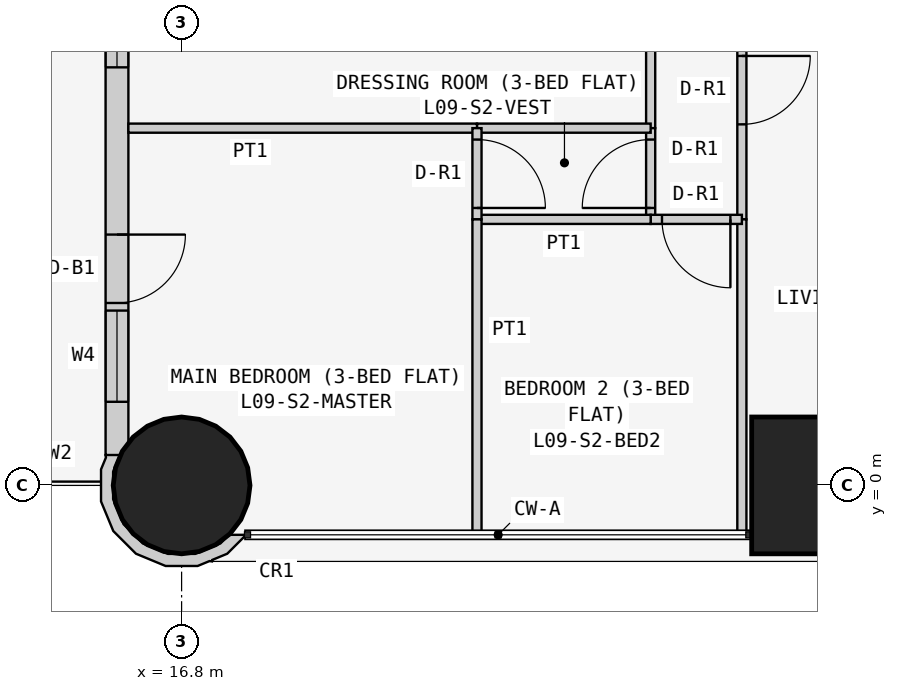
"""IFC4 building model, lengths in metres.
Left out: names, types, materials, properties, quantities, classifications, styles, units other than length and angle.
Written with IfcOpenShell. Run it as: python <this file> out.ifc"""

import sys

from ifc_helpers import new_model, si_unit, direction, frame, frame_2d, origin, origin_2d, place, context, subcontext, project, spatial, polyline, rectangle, circle, outline, extrude, element, fill, save


model = new_model("IFC4")
c1 = context("Model", 3, precision=1e-05, world=origin(), true_north=direction((0.0, 1.0)))
c2 = subcontext(c1, "Body", "Model", "MODEL_VIEW")
j1 = project(units=[si_unit("LENGTHUNIT", "METRE"), si_unit("PLANEANGLEUNIT", "RADIAN")], contexts=[c1])
p1 = place(None, origin())
s1 = spatial("IfcSite", under=j1, at=p1, CompositionType="ELEMENT")
p2 = place(p1, origin())
s2 = spatial("IfcBuilding", under=s1, at=p2, CompositionType="ELEMENT")
p3 = place(p2, frame((0.0, 0.0, 41.7)))
s3 = spatial("IfcBuildingStorey", under=s2, at=p3, CompositionType="ELEMENT", Elevation=41.7)
p4 = place(p3, frame((16.8, 0.0, 0.0), z_axis=(0.0, 0.0, 1.0), x_axis=(1.0, 0.0, 0.0)))
e1 = element("IfcColumn", 1, at=p4, inside=s3, PredefinedType="COLUMN", context=c2, shape_type="SweptSolid", body=[
    extrude(circle(Radius=0.9, at=origin_2d()), origin(), (0.0, 0.0, 1.0), 3.6),
])
p5 = place(p3, frame((25.2, 0.0, 0.0), z_axis=(0.0, 0.0, 1.0), x_axis=(1.0, 0.0, 0.0)))
e2 = element("IfcColumn", 2, at=p5, inside=s3, PredefinedType="COLUMN", context=c2, shape_type="SweptSolid", body=[
    extrude(rectangle(XDim=1.8, YDim=1.8, at=origin_2d()), origin(), (0.0, 0.0, 1.0), 3.6),
])
p6 = place(p3, frame((15.95, 15.8, 0.0), z_axis=(0.0, 0.0, 1.0), x_axis=(0.0, -1.0, 0.0)))
e3 = element("IfcWall", 3, at=p6, inside=s3, PredefinedType="SOLIDWALL", context=c2, shape_type="SweptSolid", body=[
    extrude(rectangle(XDim=15.4, YDim=0.3, at=frame_2d((7.7, 0.0))), origin(), (0.0, 0.0, 1.0), 3.45),
])
p7 = place(p6, frame((1.2, 0.0, 0.9)))
e4 = element("IfcOpeningElement", 4, at=p7, cuts=e3, PredefinedType="OPENING", context=c2, shape_type="SweptSolid", body=[
    extrude(rectangle(XDim=1.8, YDim=1.5, at=frame_2d((0.9, 0.75))), frame((0.0, 0.16, 0.0), z_axis=(0.0, -1.0, 0.0), x_axis=(1.0, 0.0, 0.0)), (0.0, 0.0, 1.0), 0.32),
])
p8 = place(p6, frame((4.95, 0.0, 1.5)))
e5 = element("IfcOpeningElement", 5, at=p8, cuts=e3, PredefinedType="OPENING", context=c2, shape_type="SweptSolid", body=[
    extrude(rectangle(XDim=0.9, YDim=0.7, at=frame_2d((0.45, 0.35))), frame((0.0, 0.16, 0.0), z_axis=(0.0, -1.0, 0.0), x_axis=(1.0, 0.0, 0.0)), (0.0, 0.0, 1.0), 0.32),
])
p9 = place(p6, frame((8.5, 0.0, 0.9)))
e6 = element("IfcOpeningElement", 6, at=p9, cuts=e3, PredefinedType="OPENING", context=c2, shape_type="SweptSolid", body=[
    extrude(rectangle(XDim=1.8, YDim=1.5, at=frame_2d((0.9, 0.75))), frame((0.0, 0.16, 0.0), z_axis=(0.0, -1.0, 0.0), x_axis=(1.0, 0.0, 0.0)), (0.0, 0.0, 1.0), 0.32),
])
p10 = place(p6, frame((12.5, 0.0, 0.0)))
e7 = element("IfcOpeningElement", 7, at=p10, cuts=e3, PredefinedType="OPENING", context=c2, shape_type="SweptSolid", body=[
    extrude(rectangle(XDim=0.9, YDim=2.4, at=frame_2d((0.45, 1.2))), frame((0.0, 0.16, 0.0), z_axis=(0.0, -1.0, 0.0), x_axis=(1.0, 0.0, 0.0)), (0.0, 0.0, 1.0), 0.32),
])
p11 = place(p6, frame((13.5, 0.0, 0.9)))
e8 = element("IfcOpeningElement", 8, at=p11, cuts=e3, PredefinedType="OPENING", context=c2, shape_type="SweptSolid", body=[
    extrude(rectangle(XDim=1.2, YDim=1.5, at=frame_2d((0.6, 0.75))), frame((0.0, 0.16, 0.0), z_axis=(0.0, -1.0, 0.0), x_axis=(1.0, 0.0, 0.0)), (0.0, 0.0, 1.0), 0.32),
])
p12 = place(p3, frame((15.89, 0.364, 0.0), z_axis=(0.0, 0.0, 1.0), x_axis=(-0.377204953059, -0.926129809145, 0.0)))
e9 = element("IfcWall", 9, at=p12, inside=s3, PredefinedType="SOLIDWALL", context=c2, shape_type="SweptSolid", body=[
    extrude(outline(polyline([(0.36, 1.803), (0.509, 1.741), (0.761, 1.486), (0.896, 1.154), (0.894, 0.795), (0.755, 0.465), (0.5, 0.213), (0.168, 0.078), (-0.1, 0.08), (0.001, -0.097), (0.03, -0.08), (0.199, -0.081), (0.589, 0.078), (0.889, 0.374), (1.053, 0.763), (1.055, 1.185), (0.896, 1.575), (0.778, 1.695), (0.769, 1.728), (0.75, 1.723), (0.6, 1.875), (0.295, 2.004), (0.281, 1.998), (0.36, 1.803)])), origin(), (0.0, 0.0, 1.0), 3.45),
])
p13 = place(p3, frame((24.171, 3.5, 0.0), z_axis=(0.0, 0.0, 1.0), x_axis=(0.0, 1.0, 0.0)))
e10 = element("IfcWall", 10, at=p13, inside=s3, PredefinedType="PARTITIONING", context=c2, shape_type="SweptSolid", body=[
    extrude(rectangle(XDim=4.9, YDim=0.12, at=frame_2d((2.45, 0.0))), origin(), (0.0, 0.0, 1.0), 3.45),
])
p14 = place(p13, frame((1.25, 0.0, 0.0)))
e11 = element("IfcOpeningElement", 11, at=p14, cuts=e10, PredefinedType="OPENING", context=c2, shape_type="SweptSolid", body=[
    extrude(rectangle(XDim=0.9, YDim=2.1, at=frame_2d((0.45, 1.05))), frame((0.0, 0.07, 0.0), z_axis=(0.0, -1.0, 0.0), x_axis=(1.0, 0.0, 0.0)), (0.0, 0.0, 1.0), 0.14),
])
p15 = place(p3, frame((24.171, -0.65, 0.0), z_axis=(0.0, 0.0, 1.0), x_axis=(0.0, 1.0, 0.0)))
e12 = element("IfcWall", 12, at=p15, inside=s3, PredefinedType="PARTITIONING", context=c2, shape_type="SweptSolid", body=[
    extrude(rectangle(XDim=4.15, YDim=0.12, at=frame_2d((2.075, 0.0))), origin(), (0.0, 0.0, 1.0), 3.45),
])
p16 = place(p3, frame((22.971, 4.7, 0.0), z_axis=(0.0, 0.0, 1.0), x_axis=(0.0, 1.0, 0.0)))
e13 = element("IfcWall", 13, at=p16, inside=s3, PredefinedType="PARTITIONING", context=c2, shape_type="SweptSolid", body=[
    extrude(rectangle(XDim=4.9, YDim=0.12, at=frame_2d((2.45, 0.0))), origin(), (0.0, 0.0, 1.0), 3.45),
])
p17 = place(p16, frame((1.65, 0.0, 0.0)))
e14 = element("IfcOpeningElement", 14, at=p17, cuts=e13, PredefinedType="OPENING", context=c2, shape_type="SweptSolid", body=[
    extrude(rectangle(XDim=0.9, YDim=2.1, at=frame_2d((0.45, 1.05))), frame((0.0, 0.07, 0.0), z_axis=(0.0, -1.0, 0.0), x_axis=(1.0, 0.0, 0.0)), (0.0, 0.0, 1.0), 0.14),
])
p18 = place(p3, frame((22.971, 3.5, 0.0), z_axis=(0.0, 0.0, 1.0), x_axis=(0.0, 1.0, 0.0)))
e15 = element("IfcWall", 15, at=p18, inside=s3, PredefinedType="PARTITIONING", context=c2, shape_type="SweptSolid", body=[
    extrude(rectangle(XDim=1.2, YDim=0.12, at=frame_2d((0.6, 0.0))), origin(), (0.0, 0.0, 1.0), 3.45),
])
p19 = place(p18, frame((0.15, 0.0, 0.0)))
e16 = element("IfcOpeningElement", 16, at=p19, cuts=e15, PredefinedType="OPENING", context=c2, shape_type="SweptSolid", body=[
    extrude(rectangle(XDim=0.9, YDim=2.1, at=frame_2d((0.45, 1.05))), frame((0.0, 0.07, 0.0), z_axis=(0.0, -1.0, 0.0), x_axis=(1.0, 0.0, 0.0)), (0.0, 0.0, 1.0), 0.14),
])
p20 = place(p3, frame((24.171, 3.5, 0.0), z_axis=(0.0, 0.0, 1.0), x_axis=(-1.0, 0.0, 0.0)))
e17 = element("IfcWall", 17, at=p20, inside=s3, PredefinedType="PARTITIONING", context=c2, shape_type="SweptSolid", body=[
    extrude(rectangle(XDim=1.2, YDim=0.12, at=frame_2d((0.6, 0.0))), origin(), (0.0, 0.0, 1.0), 3.45),
])
p21 = place(p20, frame((0.151, 0.0, 0.0)))
e18 = element("IfcOpeningElement", 18, at=p21, cuts=e17, PredefinedType="OPENING", context=c2, shape_type="SweptSolid", body=[
    extrude(rectangle(XDim=0.9, YDim=2.1, at=frame_2d((0.45, 1.05))), frame((0.0, 0.07, 0.0), z_axis=(0.0, -1.0, 0.0), x_axis=(1.0, 0.0, 0.0)), (0.0, 0.0, 1.0), 0.14),
])
p22 = place(p3, frame((22.971, 4.7, 0.0), z_axis=(0.0, 0.0, 1.0), x_axis=(-1.0, 0.0, 0.0)))
e19 = element("IfcWall", 19, at=p22, inside=s3, PredefinedType="PARTITIONING", context=c2, shape_type="SweptSolid", body=[
    extrude(rectangle(XDim=2.285, YDim=0.12, at=frame_2d((1.143, 0.0))), origin(), (0.0, 0.0, 1.0), 3.45),
])
p23 = place(p3, frame((20.686, 4.7, 0.0), z_axis=(0.0, 0.0, 1.0), x_axis=(-1.0, 0.0, 0.0)))
e20 = element("IfcWall", 20, at=p23, inside=s3, PredefinedType="PARTITIONING", context=c2, shape_type="SweptSolid", body=[
    extrude(rectangle(XDim=4.586, YDim=0.12, at=frame_2d((2.293, 0.0))), origin(), (0.0, 0.0, 1.0), 3.45),
])
p24 = place(p3, frame((22.971, 3.5, 0.0), z_axis=(0.0, 0.0, 1.0), x_axis=(-1.0, 0.0, 0.0)))
e21 = element("IfcWall", 21, at=p24, inside=s3, PredefinedType="PARTITIONING", context=c2, shape_type="SweptSolid", body=[
    extrude(rectangle(XDim=2.285, YDim=0.12, at=frame_2d((1.143, 0.0))), origin(), (0.0, 0.0, 1.0), 3.45),
])
p25 = place(p3, frame((20.686, 3.5, 0.0), z_axis=(0.0, 0.0, 1.0), x_axis=(0.0, 1.0, 0.0)))
e22 = element("IfcWall", 22, at=p25, inside=s3, PredefinedType="PARTITIONING", context=c2, shape_type="SweptSolid", body=[
    extrude(rectangle(XDim=1.2, YDim=0.12, at=frame_2d((0.6, 0.0))), origin(), (0.0, 0.0, 1.0), 3.45),
])
p26 = place(p25, frame((0.15, 0.0, 0.0)))
e23 = element("IfcOpeningElement", 23, at=p26, cuts=e22, PredefinedType="OPENING", context=c2, shape_type="SweptSolid", body=[
    extrude(rectangle(XDim=0.9, YDim=2.1, at=frame_2d((0.45, 1.05))), frame((0.0, 0.07, 0.0), z_axis=(0.0, -1.0, 0.0), x_axis=(1.0, 0.0, 0.0)), (0.0, 0.0, 1.0), 0.14),
])
p27 = place(p3, frame((20.686, -0.65, 0.0), z_axis=(0.0, 0.0, 1.0), x_axis=(0.0, 1.0, 0.0)))
e24 = element("IfcWall", 24, at=p27, inside=s3, PredefinedType="PARTITIONING", context=c2, shape_type="SweptSolid", body=[
    extrude(rectangle(XDim=4.15, YDim=0.12, at=frame_2d((2.075, 0.0))), origin(), (0.0, 0.0, 1.0), 3.45),
])
p28 = place(p9, origin())
e25 = element("IfcWindow", 25, at=p28, inside=s3, PartitioningType="SINGLE_PANEL", PredefinedType="WINDOW", context=c2, shape_type="SweptSolid", body=[
    extrude(rectangle(XDim=1.8, YDim=1.5, at=frame_2d((0.9, 0.75))), frame((0.0, 0.03, 0.0), z_axis=(0.0, -1.0, 0.0), x_axis=(1.0, 0.0, 0.0)), (0.0, 0.0, 1.0), 0.06),
])
fill(e6, e25)
p29 = place(p10, origin())
e26 = element("IfcDoor", 26, at=p29, inside=s3, OperationType="SINGLE_SWING_LEFT", PredefinedType="DOOR", context=c2, shape_type="SweptSolid", body=[
    extrude(rectangle(XDim=0.9, YDim=2.4, at=frame_2d((0.45, 1.2))), frame((0.0, 0.025, 0.0), z_axis=(0.0, -1.0, 0.0), x_axis=(1.0, 0.0, 0.0)), (0.0, 0.0, 1.0), 0.05),
])
fill(e7, e26)
p30 = place(p11, origin())
e27 = element("IfcWindow", 27, at=p30, inside=s3, PartitioningType="SINGLE_PANEL", PredefinedType="WINDOW", context=c2, shape_type="SweptSolid", body=[
    extrude(rectangle(XDim=1.2, YDim=1.5, at=frame_2d((0.6, 0.75))), frame((0.0, 0.03, 0.0), z_axis=(0.0, -1.0, 0.0), x_axis=(1.0, 0.0, 0.0)), (0.0, 0.0, 1.0), 0.06),
])
fill(e8, e27)
p31 = place(p14, frame((0.9, 0.0, 0.0), z_axis=(0.0, 0.0, 1.0), x_axis=(-1.0, 0.0, 0.0)))
e28 = element("IfcDoor", 28, at=p31, inside=s3, OperationType="SINGLE_SWING_LEFT", PredefinedType="DOOR", context=c2, shape_type="SweptSolid", body=[
    extrude(rectangle(XDim=0.9, YDim=2.1, at=frame_2d((0.45, 1.05))), frame((0.0, 0.025, 0.0), z_axis=(0.0, -1.0, 0.0), x_axis=(1.0, 0.0, 0.0)), (0.0, 0.0, 1.0), 0.05),
])
fill(e11, e28)
p32 = place(p19, origin())
e29 = element("IfcDoor", 29, at=p32, inside=s3, OperationType="SINGLE_SWING_LEFT", PredefinedType="DOOR", context=c2, shape_type="SweptSolid", body=[
    extrude(rectangle(XDim=0.9, YDim=2.1, at=frame_2d((0.45, 1.05))), frame((0.0, 0.025, 0.0), z_axis=(0.0, -1.0, 0.0), x_axis=(1.0, 0.0, 0.0)), (0.0, 0.0, 1.0), 0.05),
])
fill(e16, e29)
p33 = place(p26, frame((0.9, 0.0, 0.0), z_axis=(0.0, 0.0, 1.0), x_axis=(-1.0, 0.0, 0.0)))
e30 = element("IfcDoor", 30, at=p33, inside=s3, OperationType="SINGLE_SWING_RIGHT", PredefinedType="DOOR", context=c2, shape_type="SweptSolid", body=[
    extrude(rectangle(XDim=0.9, YDim=2.1, at=frame_2d((0.45, 1.05))), frame((0.0, 0.025, 0.0), z_axis=(0.0, -1.0, 0.0), x_axis=(1.0, 0.0, 0.0)), (0.0, 0.0, 1.0), 0.05),
])
fill(e23, e30)
p34 = place(p21, origin())
e31 = element("IfcDoor", 31, at=p34, inside=s3, OperationType="SINGLE_SWING_LEFT", PredefinedType="DOOR", context=c2, shape_type="SweptSolid", body=[
    extrude(rectangle(XDim=0.9, YDim=2.1, at=frame_2d((0.45, 1.05))), frame((0.0, 0.025, 0.0), z_axis=(0.0, -1.0, 0.0), x_axis=(1.0, 0.0, 0.0)), (0.0, 0.0, 1.0), 0.05),
])
fill(e18, e31)
save(model, sys.argv[1])
